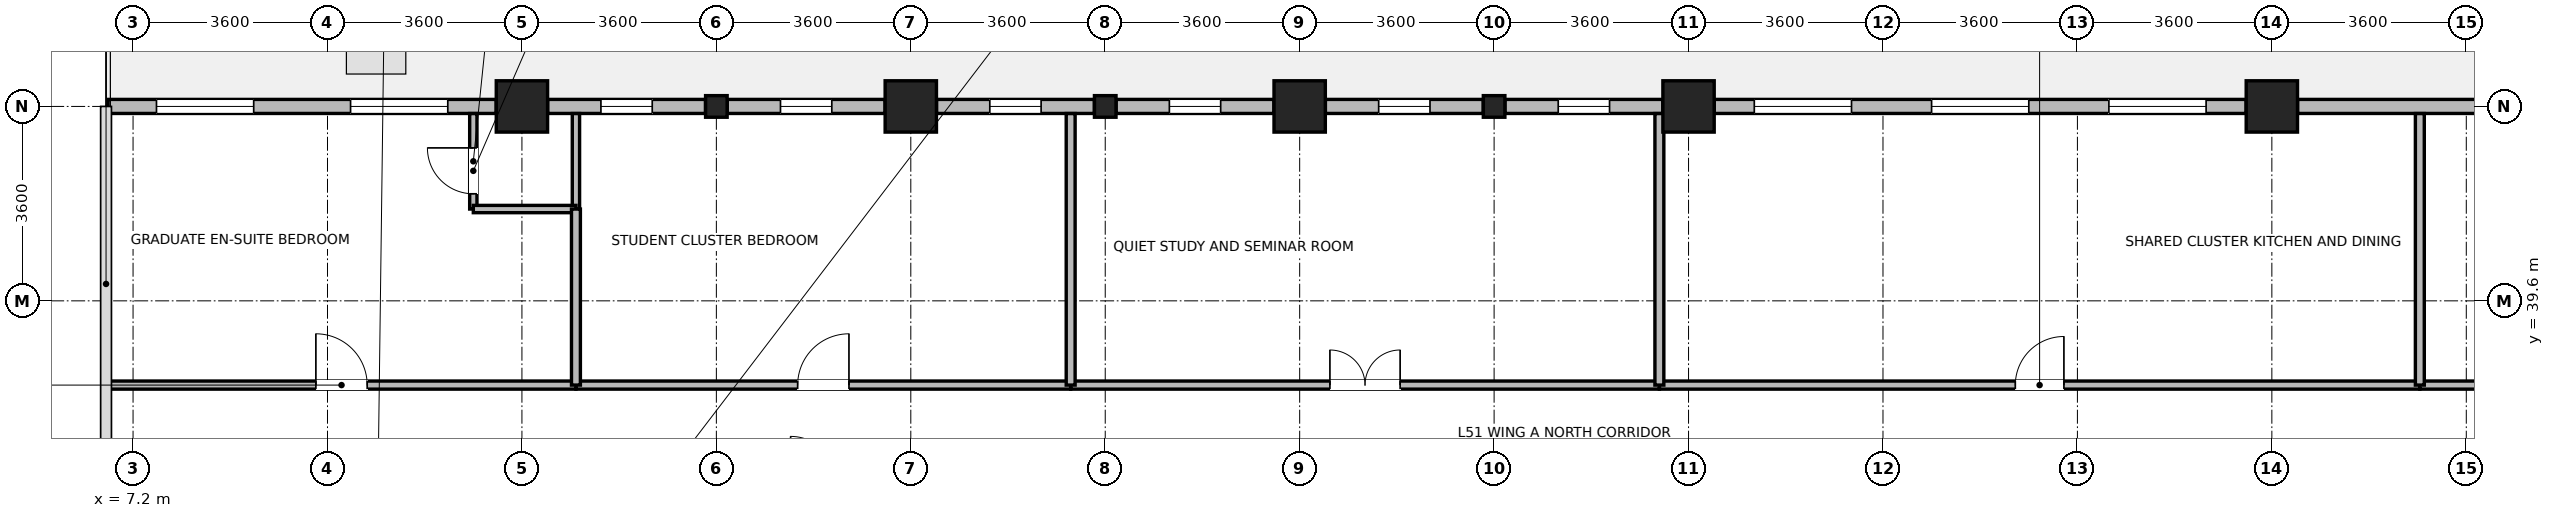
"""IFC4 building model, lengths in metres.
Left out: names, types, materials, properties, quantities, classifications, styles, units other than length and angle.
Written with IfcOpenShell. Run it as: python <this file> out.ifc"""

import sys

from ifc_helpers import new_model, si_unit, direction, frame, frame_2d, origin, origin_2d, place, context, subcontext, project, spatial, rectangle, i_section, extrude, source, transform, mapped, element, fill, save


model = new_model("IFC4")
c1 = context("Model", 3, precision=1e-05, world=origin(), true_north=direction((0.0, 1.0)))
c2 = subcontext(c1, "Body", "Model", "MODEL_VIEW")
j1 = project(units=[si_unit("LENGTHUNIT", "METRE"), si_unit("PLANEANGLEUNIT", "RADIAN")], contexts=[c1])
p1 = place(None, origin())
s1 = spatial("IfcSite", under=j1, at=p1, CompositionType="ELEMENT")
p2 = place(p1, origin())
s2 = spatial("IfcBuilding", under=s1, at=p2, CompositionType="ELEMENT")
p3 = place(p2, frame((0.0, 0.0, 201.8)))
s3 = spatial("IfcBuildingStorey", under=s2, at=p3, CompositionType="ELEMENT", Elevation=201.8)
m1 = source(origin(), c2, "Body", "SweptSolid", [
    extrude(rectangle(XDim=0.95, YDim=0.95, at=origin_2d()), origin(), (0.0, 0.0, 1.0), 3.7),
])
for number, where, z_axis, x_axis in (
    (1, (14.4, 43.2, 0.0), (0.0, 0.0, 1.0), (1.0, 0.0, 0.0)),
    (2, (21.6, 43.2, 0.0), (0.0, 0.0, 1.0), (1.0, 0.0, 0.0)),
    (3, (28.8, 43.2, 0.0), (0.0, 0.0, 1.0), (1.0, 0.0, 0.0)),
    (4, (36.0, 43.2, 0.0), (0.0, 0.0, 1.0), (1.0, 0.0, 0.0)),
    (5, (46.8, 43.2, 0.0), (0.0, 0.0, 1.0), (1.0, 0.0, 0.0)),
):
    element("IfcColumn", number, at=place(p3, frame(where, z_axis=z_axis, x_axis=x_axis)), inside=s3, PredefinedType="COLUMN", context=c2, shape_type="MappedRepresentation", body=[
        mapped(m1, transform((0.0, 0.0, 0.0), x_axis=(1.0, 0.0, 0.0), y_axis=(0.0, 1.0, 0.0), z_axis=(0.0, 0.0, 1.0), scale=1.0)),
    ])
m2 = source(origin(), c2, "Body", "SweptSolid", [
    extrude(i_section(OverallWidth=0.399, OverallDepth=0.4, WebThickness=0.017, FlangeThickness=0.023, FilletRadius=0.015, at=origin_2d()), origin(), (0.0, 0.0, 1.0), 3.7),
])
for number, where, z_axis, x_axis in (
    (6, (18.0, 43.2, 0.0), (0.0, 0.0, 1.0), (1.0, 0.0, 0.0)),
    (7, (25.2, 43.2, 0.0), (0.0, 0.0, 1.0), (1.0, 0.0, 0.0)),
    (8, (32.4, 43.2, 0.0), (0.0, 0.0, 1.0), (1.0, 0.0, 0.0)),
):
    element("IfcColumn", number, at=place(p3, frame(where, z_axis=z_axis, x_axis=x_axis)), inside=s3, PredefinedType="COLUMN", context=c2, shape_type="MappedRepresentation", body=[
        mapped(m2, transform((0.0, 0.0, 0.0), x_axis=(1.0, 0.0, 0.0), y_axis=(0.0, 1.0, 0.0), z_axis=(0.0, 0.0, 1.0), scale=1.0)),
    ])
p4 = place(p3, frame((47.276, 43.2, 0.0), z_axis=(0.0, 0.0, 1.0), x_axis=(1.0, 0.0, 0.0)))
e9 = element("IfcWall", 9, at=p4, inside=s3, PredefinedType="STANDARD", context=c2, shape_type="SweptSolid", body=[
    extrude(rectangle(XDim=13.289, YDim=0.26, at=frame_2d((6.645, 0.0))), origin(), (0.0, 0.0, 1.0), 3.45),
])
p5 = place(p4, frame((5.894, 0.0, 0.0)))
e10 = element("IfcOpeningElement", 10, at=p5, cuts=e9, PredefinedType="OPENING", context=c2, shape_type="SweptSolid", body=[
    extrude(rectangle(XDim=1.5, YDim=2.15, at=frame_2d((0.75, 1.075))), frame((0.0, 0.14, 0.0), z_axis=(0.0, -1.0, 0.0), x_axis=(1.0, 0.0, 0.0)), (0.0, 0.0, 1.0), 0.28),
])
p6 = place(p3, frame((36.476, 43.2, 0.0), z_axis=(0.0, 0.0, 1.0), x_axis=(1.0, 0.0, 0.0)))
e11 = element("IfcWall", 11, at=p6, inside=s3, PredefinedType="STANDARD", context=c2, shape_type="SweptSolid", body=[
    extrude(rectangle(XDim=9.848, YDim=0.26, at=frame_2d((4.924, 0.0))), origin(), (0.0, 0.0, 1.0), 3.0),
])
p7 = place(p6, frame((0.741, 0.0, 0.85)))
e12 = element("IfcOpeningElement", 12, at=p7, cuts=e11, PredefinedType="OPENING", context=c2, shape_type="SweptSolid", body=[
    extrude(rectangle(XDim=1.8, YDim=1.85, at=frame_2d((0.9, 0.925))), frame((0.0, 0.14, 0.0), z_axis=(0.0, -1.0, 0.0), x_axis=(1.0, 0.0, 0.0)), (0.0, 0.0, 1.0), 0.28),
])
p8 = place(p6, frame((4.024, 0.0, 0.85)))
e13 = element("IfcOpeningElement", 13, at=p8, cuts=e11, PredefinedType="OPENING", context=c2, shape_type="SweptSolid", body=[
    extrude(rectangle(XDim=1.8, YDim=1.85, at=frame_2d((0.9, 0.925))), frame((0.0, 0.14, 0.0), z_axis=(0.0, -1.0, 0.0), x_axis=(1.0, 0.0, 0.0)), (0.0, 0.0, 1.0), 0.28),
])
p9 = place(p6, frame((7.307, 0.0, 0.85)))
e14 = element("IfcOpeningElement", 14, at=p9, cuts=e11, PredefinedType="OPENING", context=c2, shape_type="SweptSolid", body=[
    extrude(rectangle(XDim=1.8, YDim=1.85, at=frame_2d((0.9, 0.925))), frame((0.0, 0.14, 0.0), z_axis=(0.0, -1.0, 0.0), x_axis=(1.0, 0.0, 0.0)), (0.0, 0.0, 1.0), 0.28),
])
p10 = place(p3, frame((32.601, 43.2, 0.0), z_axis=(0.0, 0.0, 1.0), x_axis=(1.0, 0.0, 0.0)))
e15 = element("IfcWall", 15, at=p10, inside=s3, PredefinedType="STANDARD", context=c2, shape_type="SweptSolid", body=[
    extrude(rectangle(XDim=2.923, YDim=0.26, at=frame_2d((1.462, 0.0))), origin(), (0.0, 0.0, 1.0), 3.0),
])
p11 = place(p10, frame((0.987, 0.0, 0.85)))
e16 = element("IfcOpeningElement", 16, at=p11, cuts=e15, PredefinedType="OPENING", context=c2, shape_type="SweptSolid", body=[
    extrude(rectangle(XDim=0.95, YDim=1.75, at=frame_2d((0.475, 0.875))), frame((0.0, 0.14, 0.0), z_axis=(0.0, -1.0, 0.0), x_axis=(1.0, 0.0, 0.0)), (0.0, 0.0, 1.0), 0.28),
])
p12 = place(p3, frame((29.276, 43.2, 0.0), z_axis=(0.0, 0.0, 1.0), x_axis=(1.0, 0.0, 0.0)))
e17 = element("IfcWall", 17, at=p12, inside=s3, PredefinedType="STANDARD", context=c2, shape_type="SweptSolid", body=[
    extrude(rectangle(XDim=2.924, YDim=0.26, at=frame_2d((1.462, 0.0))), origin(), (0.0, 0.0, 1.0), 3.0),
])
p13 = place(p12, frame((0.987, 0.0, 0.85)))
e18 = element("IfcOpeningElement", 18, at=p13, cuts=e17, PredefinedType="OPENING", context=c2, shape_type="SweptSolid", body=[
    extrude(rectangle(XDim=0.95, YDim=1.75, at=frame_2d((0.475, 0.875))), frame((0.0, 0.14, 0.0), z_axis=(0.0, -1.0, 0.0), x_axis=(1.0, 0.0, 0.0)), (0.0, 0.0, 1.0), 0.28),
])
p14 = place(p3, frame((25.4, 43.2, 0.0), z_axis=(0.0, 0.0, 1.0), x_axis=(1.0, 0.0, 0.0)))
e19 = element("IfcWall", 19, at=p14, inside=s3, PredefinedType="STANDARD", context=c2, shape_type="SweptSolid", body=[
    extrude(rectangle(XDim=2.924, YDim=0.26, at=frame_2d((1.462, 0.0))), origin(), (0.0, 0.0, 1.0), 3.0),
])
p15 = place(p14, frame((0.987, 0.0, 0.85)))
e20 = element("IfcOpeningElement", 20, at=p15, cuts=e19, PredefinedType="OPENING", context=c2, shape_type="SweptSolid", body=[
    extrude(rectangle(XDim=0.95, YDim=1.75, at=frame_2d((0.475, 0.875))), frame((0.0, 0.14, 0.0), z_axis=(0.0, -1.0, 0.0), x_axis=(1.0, 0.0, 0.0)), (0.0, 0.0, 1.0), 0.28),
])
p16 = place(p3, frame((22.076, 43.2, 0.0), z_axis=(0.0, 0.0, 1.0), x_axis=(1.0, 0.0, 0.0)))
e21 = element("IfcWall", 21, at=p16, inside=s3, PredefinedType="STANDARD", context=c2, shape_type="SweptSolid", body=[
    extrude(rectangle(XDim=2.924, YDim=0.26, at=frame_2d((1.462, 0.0))), origin(), (0.0, 0.0, 1.0), 3.0),
])
p17 = place(p16, frame((0.987, 0.0, 0.85)))
e22 = element("IfcOpeningElement", 22, at=p17, cuts=e21, PredefinedType="OPENING", context=c2, shape_type="SweptSolid", body=[
    extrude(rectangle(XDim=0.95, YDim=1.75, at=frame_2d((0.475, 0.875))), frame((0.0, 0.14, 0.0), z_axis=(0.0, -1.0, 0.0), x_axis=(1.0, 0.0, 0.0)), (0.0, 0.0, 1.0), 0.28),
])
p18 = place(p3, frame((18.2, 43.2, 0.0), z_axis=(0.0, 0.0, 1.0), x_axis=(1.0, 0.0, 0.0)))
e23 = element("IfcWall", 23, at=p18, inside=s3, PredefinedType="STANDARD", context=c2, shape_type="SweptSolid", body=[
    extrude(rectangle(XDim=2.924, YDim=0.26, at=frame_2d((1.462, 0.0))), origin(), (0.0, 0.0, 1.0), 3.0),
])
p19 = place(p18, frame((0.987, 0.0, 0.85)))
e24 = element("IfcOpeningElement", 24, at=p19, cuts=e23, PredefinedType="OPENING", context=c2, shape_type="SweptSolid", body=[
    extrude(rectangle(XDim=0.95, YDim=1.75, at=frame_2d((0.475, 0.875))), frame((0.0, 0.14, 0.0), z_axis=(0.0, -1.0, 0.0), x_axis=(1.0, 0.0, 0.0)), (0.0, 0.0, 1.0), 0.28),
])
p20 = place(p3, frame((14.876, 43.2, 0.0), z_axis=(0.0, 0.0, 1.0), x_axis=(1.0, 0.0, 0.0)))
e25 = element("IfcWall", 25, at=p20, inside=s3, PredefinedType="STANDARD", context=c2, shape_type="SweptSolid", body=[
    extrude(rectangle(XDim=2.924, YDim=0.26, at=frame_2d((1.462, 0.0))), origin(), (0.0, 0.0, 1.0), 3.0),
])
p21 = place(p20, frame((0.987, 0.0, 0.85)))
e26 = element("IfcOpeningElement", 26, at=p21, cuts=e25, PredefinedType="OPENING", context=c2, shape_type="SweptSolid", body=[
    extrude(rectangle(XDim=0.95, YDim=1.75, at=frame_2d((0.475, 0.875))), frame((0.0, 0.14, 0.0), z_axis=(0.0, -1.0, 0.0), x_axis=(1.0, 0.0, 0.0)), (0.0, 0.0, 1.0), 0.28),
])
p22 = place(p3, frame((6.737, 43.2, 0.0), z_axis=(0.0, 0.0, 1.0), x_axis=(1.0, 0.0, 0.0)))
e27 = element("IfcWall", 27, at=p22, inside=s3, PredefinedType="STANDARD", context=c2, shape_type="SweptSolid", body=[
    extrude(rectangle(XDim=7.187, YDim=0.26, at=frame_2d((3.594, 0.0))), origin(), (0.0, 0.0, 1.0), 3.45),
])
p23 = place(p22, frame((0.897, 0.0, 0.85)))
e28 = element("IfcOpeningElement", 28, at=p23, cuts=e27, PredefinedType="OPENING", context=c2, shape_type="SweptSolid", body=[
    extrude(rectangle(XDim=1.8, YDim=1.85, at=frame_2d((0.9, 0.925))), frame((0.0, 0.14, 0.0), z_axis=(0.0, -1.0, 0.0), x_axis=(1.0, 0.0, 0.0)), (0.0, 0.0, 1.0), 0.28),
])
p24 = place(p22, frame((4.49, 0.0, 0.85)))
e29 = element("IfcOpeningElement", 29, at=p24, cuts=e27, PredefinedType="OPENING", context=c2, shape_type="SweptSolid", body=[
    extrude(rectangle(XDim=1.8, YDim=1.85, at=frame_2d((0.9, 0.925))), frame((0.0, 0.14, 0.0), z_axis=(0.0, -1.0, 0.0), x_axis=(1.0, 0.0, 0.0)), (0.0, 0.0, 1.0), 0.28),
])
p25 = place(p3, frame((13.5, 41.3, 0.0), z_axis=(0.0, 0.0, 1.0), x_axis=(0.0, 1.0, 0.0)))
e30 = element("IfcWall", 30, at=p25, inside=s3, PredefinedType="PARTITIONING", context=c2, shape_type="SweptSolid", body=[
    extrude(rectangle(XDim=1.768, YDim=0.135, at=frame_2d((0.884, 0.0))), origin(), (0.0, 0.0, 1.0), 3.45),
])
p26 = place(p25, frame((0.282, 0.0, 0.0)))
e31 = element("IfcOpeningElement", 31, at=p26, cuts=e30, PredefinedType="OPENING", context=c2, shape_type="SweptSolid", body=[
    extrude(rectangle(XDim=0.85, YDim=2.04, at=frame_2d((0.425, 1.02))), frame((0.0, 0.078, 0.0), z_axis=(0.0, -1.0, 0.0), x_axis=(1.0, 0.0, 0.0)), (0.0, 0.0, 1.0), 0.155),
])
p27 = place(p3, frame((15.4, 41.3, 0.0), z_axis=(0.0, 0.0, 1.0), x_axis=(0.0, 1.0, 0.0)))
e32 = element("IfcWall", 32, at=p27, inside=s3, PredefinedType="PARTITIONING", context=c2, shape_type="SweptSolid", body=[
    extrude(rectangle(XDim=1.768, YDim=0.135, at=frame_2d((0.884, 0.0))), origin(), (0.0, 0.0, 1.0), 3.45),
])
p28 = place(p3, frame((13.5, 41.3, 0.0), z_axis=(0.0, 0.0, 1.0), x_axis=(1.0, 0.0, 0.0)))
e33 = element("IfcWall", 33, at=p28, inside=s3, PredefinedType="PARTITIONING", context=c2, shape_type="SweptSolid", body=[
    extrude(rectangle(XDim=1.9, YDim=0.135, at=frame_2d((0.95, 0.0))), origin(), (0.0, 0.0, 1.0), 3.45),
])
p29 = place(p3, frame((35.46, 38.04, 0.0), z_axis=(0.0, 0.0, 1.0), x_axis=(1.0, 0.0, 0.0)))
e34 = element("IfcWall", 34, at=p29, inside=s3, PredefinedType="PARTITIONING", context=c2, shape_type="SweptSolid", body=[
    extrude(rectangle(XDim=14.08, YDim=0.15, at=frame_2d((7.04, 0.0))), origin(), (0.0, 0.0, 1.0), 3.45),
])
p30 = place(p29, frame((6.59, 0.0, 0.0)))
e35 = element("IfcOpeningElement", 35, at=p30, cuts=e34, PredefinedType="OPENING", context=c2, shape_type="SweptSolid", body=[
    extrude(rectangle(XDim=0.9, YDim=2.08, at=frame_2d((0.45, 1.04))), frame((0.0, 0.085, 0.0), z_axis=(0.0, -1.0, 0.0), x_axis=(1.0, 0.0, 0.0)), (0.0, 0.0, 1.0), 0.17),
])
p31 = place(p3, frame((24.56, 38.04, 0.0), z_axis=(0.0, 0.0, 1.0), x_axis=(1.0, 0.0, 0.0)))
e36 = element("IfcWall", 36, at=p31, inside=s3, PredefinedType="PARTITIONING", context=c2, shape_type="SweptSolid", body=[
    extrude(rectangle(XDim=10.9, YDim=0.15, at=frame_2d((5.45, 0.0))), origin(), (0.0, 0.0, 1.0), 3.45),
])
p32 = place(p31, frame((4.8, 0.0, 0.0)))
e37 = element("IfcOpeningElement", 37, at=p32, cuts=e36, PredefinedType="OPENING", context=c2, shape_type="SweptSolid", body=[
    extrude(rectangle(XDim=1.3, YDim=2.12, at=frame_2d((0.65, 1.06))), frame((0.0, 0.085, 0.0), z_axis=(0.0, -1.0, 0.0), x_axis=(1.0, 0.0, 0.0)), (0.0, 0.0, 1.0), 0.17),
])
p33 = place(p3, frame((49.54, 38.04, 0.0), z_axis=(0.0, 0.0, 1.0), x_axis=(1.0, 0.0, 0.0)))
e38 = element("IfcWall", 38, at=p33, inside=s3, PredefinedType="PARTITIONING", context=c2, shape_type="SweptSolid", body=[
    extrude(rectangle(XDim=9.3, YDim=0.15, at=frame_2d((4.65, 0.0))), origin(), (0.0, 0.0, 1.0), 3.45),
])
p34 = place(p33, frame((4.0, 0.0, 0.0)))
e39 = element("IfcOpeningElement", 39, at=p34, cuts=e38, PredefinedType="OPENING", context=c2, shape_type="SweptSolid", body=[
    extrude(rectangle(XDim=1.3, YDim=2.12, at=frame_2d((0.65, 1.06))), frame((0.0, 0.085, 0.0), z_axis=(0.0, -1.0, 0.0), x_axis=(1.0, 0.0, 0.0)), (0.0, 0.0, 1.0), 0.17),
])
p35 = place(p3, frame((15.4, 38.04, 0.0), z_axis=(0.0, 0.0, 1.0), x_axis=(1.0, 0.0, 0.0)))
e40 = element("IfcWall", 40, at=p35, inside=s3, PredefinedType="PARTITIONING", context=c2, shape_type="SweptSolid", body=[
    extrude(rectangle(XDim=9.16, YDim=0.15, at=frame_2d((4.58, 0.0))), origin(), (0.0, 0.0, 1.0), 3.45),
])
p36 = place(p35, frame((4.105, 0.0, 0.0)))
e41 = element("IfcOpeningElement", 41, at=p36, cuts=e40, PredefinedType="OPENING", context=c2, shape_type="SweptSolid", body=[
    extrude(rectangle(XDim=0.95, YDim=2.1, at=frame_2d((0.475, 1.05))), frame((0.0, 0.085, 0.0), z_axis=(0.0, -1.0, 0.0), x_axis=(1.0, 0.0, 0.0)), (0.0, 0.0, 1.0), 0.17),
])
p37 = place(p3, frame((6.72, 38.04, 0.0), z_axis=(0.0, 0.0, 1.0), x_axis=(1.0, 0.0, 0.0)))
e42 = element("IfcWall", 42, at=p37, inside=s3, PredefinedType="PARTITIONING", context=c2, shape_type="SweptSolid", body=[
    extrude(rectangle(XDim=8.68, YDim=0.15, at=frame_2d((4.34, 0.0))), origin(), (0.0, 0.0, 1.0), 3.45),
])
p38 = place(p37, frame((3.865, 0.0, 0.0)))
e43 = element("IfcOpeningElement", 43, at=p38, cuts=e42, PredefinedType="OPENING", context=c2, shape_type="SweptSolid", body=[
    extrude(rectangle(XDim=0.95, YDim=2.1, at=frame_2d((0.475, 1.05))), frame((0.0, 0.085, 0.0), z_axis=(0.0, -1.0, 0.0), x_axis=(1.0, 0.0, 0.0)), (0.0, 0.0, 1.0), 0.17),
])
for number, where, z_axis, x_axis in (
    (44, (24.56, 38.04, 0.0), (0.0, 0.0, 1.0), (0.0, 1.0, 0.0)),
    (45, (35.46, 38.04, 0.0), (0.0, 0.0, 1.0), (0.0, 1.0, 0.0)),
    (46, (49.54, 38.04, 0.0), (0.0, 0.0, 1.0), (0.0, 1.0, 0.0)),
):
    element("IfcWall", number, at=place(p3, frame(where, z_axis=z_axis, x_axis=x_axis)), inside=s3, PredefinedType="PARTITIONING", context=c2, shape_type="SweptSolid", body=[
        extrude(rectangle(XDim=5.028, YDim=0.165, at=frame_2d((2.514, 0.0))), origin(), (0.0, 0.0, 1.0), 3.45),
    ])
p39 = place(p3, frame((15.4, 38.04, 0.0), z_axis=(0.0, 0.0, 1.0), x_axis=(0.0, 1.0, 0.0)))
e47 = element("IfcWall", 47, at=p39, inside=s3, PredefinedType="PARTITIONING", context=c2, shape_type="SweptSolid", body=[
    extrude(rectangle(XDim=3.26, YDim=0.165, at=frame_2d((1.63, 0.0))), origin(), (0.0, 0.0, 1.0), 3.45),
])
p40 = place(p7, origin())
e48 = element("IfcWindow", 48, at=p40, inside=s3, PartitioningType="SINGLE_PANEL", PredefinedType="WINDOW", context=c2, shape_type="SweptSolid", body=[
    extrude(rectangle(XDim=1.8, YDim=1.85, at=frame_2d((0.9, 0.925))), frame((0.0, 0.03, 0.0), z_axis=(0.0, -1.0, 0.0), x_axis=(1.0, 0.0, 0.0)), (0.0, 0.0, 1.0), 0.06),
])
fill(e12, e48)
p41 = place(p8, origin())
e49 = element("IfcWindow", 49, at=p41, inside=s3, PartitioningType="SINGLE_PANEL", PredefinedType="WINDOW", context=c2, shape_type="SweptSolid", body=[
    extrude(rectangle(XDim=1.8, YDim=1.85, at=frame_2d((0.9, 0.925))), frame((0.0, 0.03, 0.0), z_axis=(0.0, -1.0, 0.0), x_axis=(1.0, 0.0, 0.0)), (0.0, 0.0, 1.0), 0.06),
])
fill(e13, e49)
p42 = place(p9, origin())
e50 = element("IfcWindow", 50, at=p42, inside=s3, PartitioningType="SINGLE_PANEL", PredefinedType="WINDOW", context=c2, shape_type="SweptSolid", body=[
    extrude(rectangle(XDim=1.8, YDim=1.85, at=frame_2d((0.9, 0.925))), frame((0.0, 0.03, 0.0), z_axis=(0.0, -1.0, 0.0), x_axis=(1.0, 0.0, 0.0)), (0.0, 0.0, 1.0), 0.06),
])
fill(e14, e50)
p43 = place(p11, origin())
e51 = element("IfcWindow", 51, at=p43, inside=s3, PartitioningType="SINGLE_PANEL", PredefinedType="WINDOW", context=c2, shape_type="SweptSolid", body=[
    extrude(rectangle(XDim=0.95, YDim=1.75, at=frame_2d((0.475, 0.875))), frame((0.0, 0.03, 0.0), z_axis=(0.0, -1.0, 0.0), x_axis=(1.0, 0.0, 0.0)), (0.0, 0.0, 1.0), 0.06),
])
fill(e16, e51)
p44 = place(p13, origin())
e52 = element("IfcWindow", 52, at=p44, inside=s3, PartitioningType="SINGLE_PANEL", PredefinedType="WINDOW", context=c2, shape_type="SweptSolid", body=[
    extrude(rectangle(XDim=0.95, YDim=1.75, at=frame_2d((0.475, 0.875))), frame((0.0, 0.03, 0.0), z_axis=(0.0, -1.0, 0.0), x_axis=(1.0, 0.0, 0.0)), (0.0, 0.0, 1.0), 0.06),
])
fill(e18, e52)
p45 = place(p15, origin())
e53 = element("IfcWindow", 53, at=p45, inside=s3, PartitioningType="SINGLE_PANEL", PredefinedType="WINDOW", context=c2, shape_type="SweptSolid", body=[
    extrude(rectangle(XDim=0.95, YDim=1.75, at=frame_2d((0.475, 0.875))), frame((0.0, 0.03, 0.0), z_axis=(0.0, -1.0, 0.0), x_axis=(1.0, 0.0, 0.0)), (0.0, 0.0, 1.0), 0.06),
])
fill(e20, e53)
p46 = place(p17, origin())
e54 = element("IfcWindow", 54, at=p46, inside=s3, PartitioningType="SINGLE_PANEL", PredefinedType="WINDOW", context=c2, shape_type="SweptSolid", body=[
    extrude(rectangle(XDim=0.95, YDim=1.75, at=frame_2d((0.475, 0.875))), frame((0.0, 0.03, 0.0), z_axis=(0.0, -1.0, 0.0), x_axis=(1.0, 0.0, 0.0)), (0.0, 0.0, 1.0), 0.06),
])
fill(e22, e54)
p47 = place(p19, origin())
e55 = element("IfcWindow", 55, at=p47, inside=s3, PartitioningType="SINGLE_PANEL", PredefinedType="WINDOW", context=c2, shape_type="SweptSolid", body=[
    extrude(rectangle(XDim=0.95, YDim=1.75, at=frame_2d((0.475, 0.875))), frame((0.0, 0.03, 0.0), z_axis=(0.0, -1.0, 0.0), x_axis=(1.0, 0.0, 0.0)), (0.0, 0.0, 1.0), 0.06),
])
fill(e24, e55)
p48 = place(p21, origin())
e56 = element("IfcWindow", 56, at=p48, inside=s3, PartitioningType="SINGLE_PANEL", PredefinedType="WINDOW", context=c2, shape_type="SweptSolid", body=[
    extrude(rectangle(XDim=0.95, YDim=1.75, at=frame_2d((0.475, 0.875))), frame((0.0, 0.03, 0.0), z_axis=(0.0, -1.0, 0.0), x_axis=(1.0, 0.0, 0.0)), (0.0, 0.0, 1.0), 0.06),
])
fill(e26, e56)
p49 = place(p23, origin())
e57 = element("IfcWindow", 57, at=p49, inside=s3, PartitioningType="SINGLE_PANEL", PredefinedType="WINDOW", context=c2, shape_type="SweptSolid", body=[
    extrude(rectangle(XDim=1.8, YDim=1.85, at=frame_2d((0.9, 0.925))), frame((0.0, 0.03, 0.0), z_axis=(0.0, -1.0, 0.0), x_axis=(1.0, 0.0, 0.0)), (0.0, 0.0, 1.0), 0.06),
])
fill(e28, e57)
p50 = place(p24, origin())
e58 = element("IfcWindow", 58, at=p50, inside=s3, PartitioningType="SINGLE_PANEL", PredefinedType="WINDOW", context=c2, shape_type="SweptSolid", body=[
    extrude(rectangle(XDim=1.8, YDim=1.85, at=frame_2d((0.9, 0.925))), frame((0.0, 0.03, 0.0), z_axis=(0.0, -1.0, 0.0), x_axis=(1.0, 0.0, 0.0)), (0.0, 0.0, 1.0), 0.06),
])
fill(e29, e58)
p51 = place(p26, origin())
e59 = element("IfcDoor", 59, at=p51, inside=s3, OperationType="SINGLE_SWING_RIGHT", PredefinedType="DOOR", context=c2, shape_type="SweptSolid", body=[
    extrude(rectangle(XDim=0.85, YDim=2.04, at=frame_2d((0.425, 1.02))), frame((0.0, 0.025, 0.0), z_axis=(0.0, -1.0, 0.0), x_axis=(1.0, 0.0, 0.0)), (0.0, 0.0, 1.0), 0.05),
])
fill(e31, e59)
p52 = place(p30, origin())
e60 = element("IfcDoor", 60, at=p52, inside=s3, OperationType="SINGLE_SWING_RIGHT", PredefinedType="DOOR", context=c2, shape_type="SweptSolid", body=[
    extrude(rectangle(XDim=0.9, YDim=2.08, at=frame_2d((0.45, 1.04))), frame((0.0, 0.025, 0.0), z_axis=(0.0, -1.0, 0.0), x_axis=(1.0, 0.0, 0.0)), (0.0, 0.0, 1.0), 0.05),
])
fill(e35, e60)
p53 = place(p32, origin())
e61 = element("IfcDoor", 61, at=p53, inside=s3, OperationType="DOUBLE_DOOR_SINGLE_SWING", PredefinedType="DOOR", context=c2, shape_type="SweptSolid", body=[
    extrude(rectangle(XDim=1.3, YDim=2.12, at=frame_2d((0.65, 1.06))), frame((0.0, 0.025, 0.0), z_axis=(0.0, -1.0, 0.0), x_axis=(1.0, 0.0, 0.0)), (0.0, 0.0, 1.0), 0.05),
])
fill(e37, e61)
p54 = place(p36, origin())
e62 = element("IfcDoor", 62, at=p54, inside=s3, OperationType="SINGLE_SWING_RIGHT", PredefinedType="DOOR", context=c2, shape_type="SweptSolid", body=[
    extrude(rectangle(XDim=0.95, YDim=2.1, at=frame_2d((0.475, 1.05))), frame((0.0, 0.025, 0.0), z_axis=(0.0, -1.0, 0.0), x_axis=(1.0, 0.0, 0.0)), (0.0, 0.0, 1.0), 0.05),
])
fill(e41, e62)
p55 = place(p38, origin())
e63 = element("IfcDoor", 63, at=p55, inside=s3, OperationType="SINGLE_SWING_LEFT", PredefinedType="DOOR", context=c2, shape_type="SweptSolid", body=[
    extrude(rectangle(XDim=0.95, YDim=2.1, at=frame_2d((0.475, 1.05))), frame((0.0, 0.025, 0.0), z_axis=(0.0, -1.0, 0.0), x_axis=(1.0, 0.0, 0.0)), (0.0, 0.0, 1.0), 0.05),
])
fill(e43, e63)
save(model, sys.argv[1])
